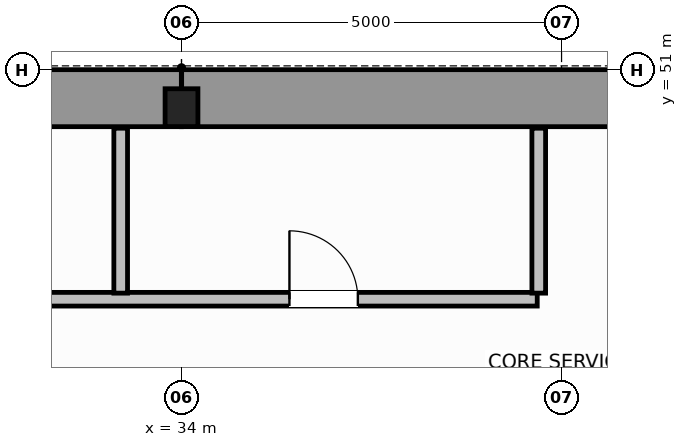
"""IFC4 building model, lengths in metres.
Left out: names, types, materials, properties, quantities, classifications, styles, units other than length and angle.
Written with IfcOpenShell. Run it as: python <this file> out.ifc"""

import sys

from ifc_helpers import new_model, si_unit, direction, frame, frame_2d, origin, origin_2d, place, context, subcontext, project, spatial, rectangle, i_section, extrude, source, transform, mapped, element, fill, save


model = new_model("IFC4")
c1 = context("Model", 3, precision=1e-05, world=origin(), true_north=direction((0.0, 1.0)))
c2 = subcontext(c1, "Body", "Model", "MODEL_VIEW")
j1 = project(units=[si_unit("LENGTHUNIT", "METRE"), si_unit("PLANEANGLEUNIT", "RADIAN")], contexts=[c1])
p1 = place(None, origin())
s1 = spatial("IfcSite", under=j1, at=p1, CompositionType="ELEMENT")
p2 = place(p1, origin())
s2 = spatial("IfcBuilding", under=s1, at=p2, CompositionType="ELEMENT")
p3 = place(p2, frame((0.0, 0.0, 165.2)))
s3 = spatial("IfcBuildingStorey", under=s2, at=p3, CompositionType="ELEMENT", Elevation=165.2)
m1 = source(origin(), c2, "Body", "SweptSolid", [
    extrude(i_section(OverallWidth=0.432, OverallDepth=0.498, WebThickness=0.055, FlangeThickness=0.068, FilletRadius=0.015, at=origin_2d()), origin(), (0.0, 0.0, 1.0), 3.8),
])
p4 = place(p3, frame((34.0, 50.5, 0.0), z_axis=(0.0, 0.0, 1.0), x_axis=(1.0, 0.0, 0.0)))
e1 = element("IfcColumn", 1, at=p4, inside=s3, PredefinedType="COLUMN", context=c2, shape_type="MappedRepresentation", body=[
    mapped(m1, transform((0.0, 0.0, 0.0), scale=1.0)),
])
for number, where, z_axis, x_axis in (
    (2, (14.379, 50.625, 0.0), (0.0, 0.0, 1.0), (1.0, 0.0, 0.0)),
    (3, (34.002, 50.625, 0.0), (0.0, 0.0, 1.0), (1.0, 0.0, 0.0)),
):
    element("IfcWall", number, at=place(p3, frame(where, z_axis=z_axis, x_axis=x_axis)), inside=s3, PredefinedType="SHEAR", context=c2, shape_type="SweptSolid", body=[
        extrude(rectangle(XDim=19.619, YDim=0.75, at=frame_2d((9.81, 0.0))), origin(), (0.0, 0.0, 1.0), 3.8),
    ])
p5 = place(p3, frame((18.62, 47.98, 0.0), z_axis=(0.0, 0.0, 1.0), x_axis=(1.0, 0.0, 0.0)))
e4 = element("IfcWall", 4, at=p5, inside=s3, PredefinedType="PLUMBINGWALL", context=c2, shape_type="SweptSolid", body=[
    extrude(rectangle(XDim=20.06, YDim=0.18, at=frame_2d((10.03, 0.0))), origin(), (0.0, 0.0, 1.0), 3.58),
])
p6 = place(p5, frame((3.5, 0.0, 0.0)))
e5 = element("IfcOpeningElement", 5, at=p6, cuts=e4, PredefinedType="OPENING", context=c2, shape_type="SweptSolid", body=[
    extrude(rectangle(XDim=0.9, YDim=2.15, at=frame_2d((0.45, 1.075))), frame((0.0, 0.1, 0.0), z_axis=(0.0, -1.0, 0.0), x_axis=(1.0, 0.0, 0.0)), (0.0, 0.0, 1.0), 0.2),
])
p7 = place(p5, frame((10.8, 0.0, 0.0)))
e6 = element("IfcOpeningElement", 6, at=p7, cuts=e4, PredefinedType="OPENING", context=c2, shape_type="SweptSolid", body=[
    extrude(rectangle(XDim=0.9, YDim=2.15, at=frame_2d((0.45, 1.075))), frame((0.0, 0.1, 0.0), z_axis=(0.0, -1.0, 0.0), x_axis=(1.0, 0.0, 0.0)), (0.0, 0.0, 1.0), 0.2),
])
p8 = place(p5, frame((16.8, 0.0, 0.0)))
e7 = element("IfcOpeningElement", 7, at=p8, cuts=e4, PredefinedType="OPENING", context=c2, shape_type="SweptSolid", body=[
    extrude(rectangle(XDim=0.9, YDim=2.15, at=frame_2d((0.45, 1.075))), frame((0.0, 0.1, 0.0), z_axis=(0.0, -1.0, 0.0), x_axis=(1.0, 0.0, 0.0)), (0.0, 0.0, 1.0), 0.2),
])
for number, where, z_axis, x_axis in (
    (8, (33.2, 48.06, 0.0), (0.0, 0.0, 1.0), (0.0, 1.0, 0.0)),
    (9, (38.7, 48.06, 0.0), (0.0, 0.0, 1.0), (0.0, 1.0, 0.0)),
):
    element("IfcWall", number, at=place(p3, frame(where, z_axis=z_axis, x_axis=x_axis)), inside=s3, PredefinedType="PLUMBINGWALL", context=c2, shape_type="SweptSolid", body=[
        extrude(rectangle(XDim=2.17, YDim=0.18, at=frame_2d((1.085, 0.0))), origin(), (0.0, 0.0, 1.0), 3.58),
    ])
m2 = source(origin(), c2, "Body", "SweptSolid", [
    extrude(rectangle(XDim=0.9, YDim=2.15, at=frame_2d((0.45, 1.075))), frame((0.0, 0.025, 0.0), z_axis=(0.0, -1.0, 0.0), x_axis=(1.0, 0.0, 0.0)), (0.0, 0.0, 1.0), 0.05),
])
p9 = place(p8, origin())
e10 = element("IfcDoor", 10, at=p9, inside=s3, OperationType="SINGLE_SWING_LEFT", PredefinedType="DOOR", context=c2, shape_type="MappedRepresentation", body=[
    mapped(m2, transform((0.0, 0.0, 0.0), scale=1.0)),
])
fill(e7, e10)
save(model, sys.argv[1])
